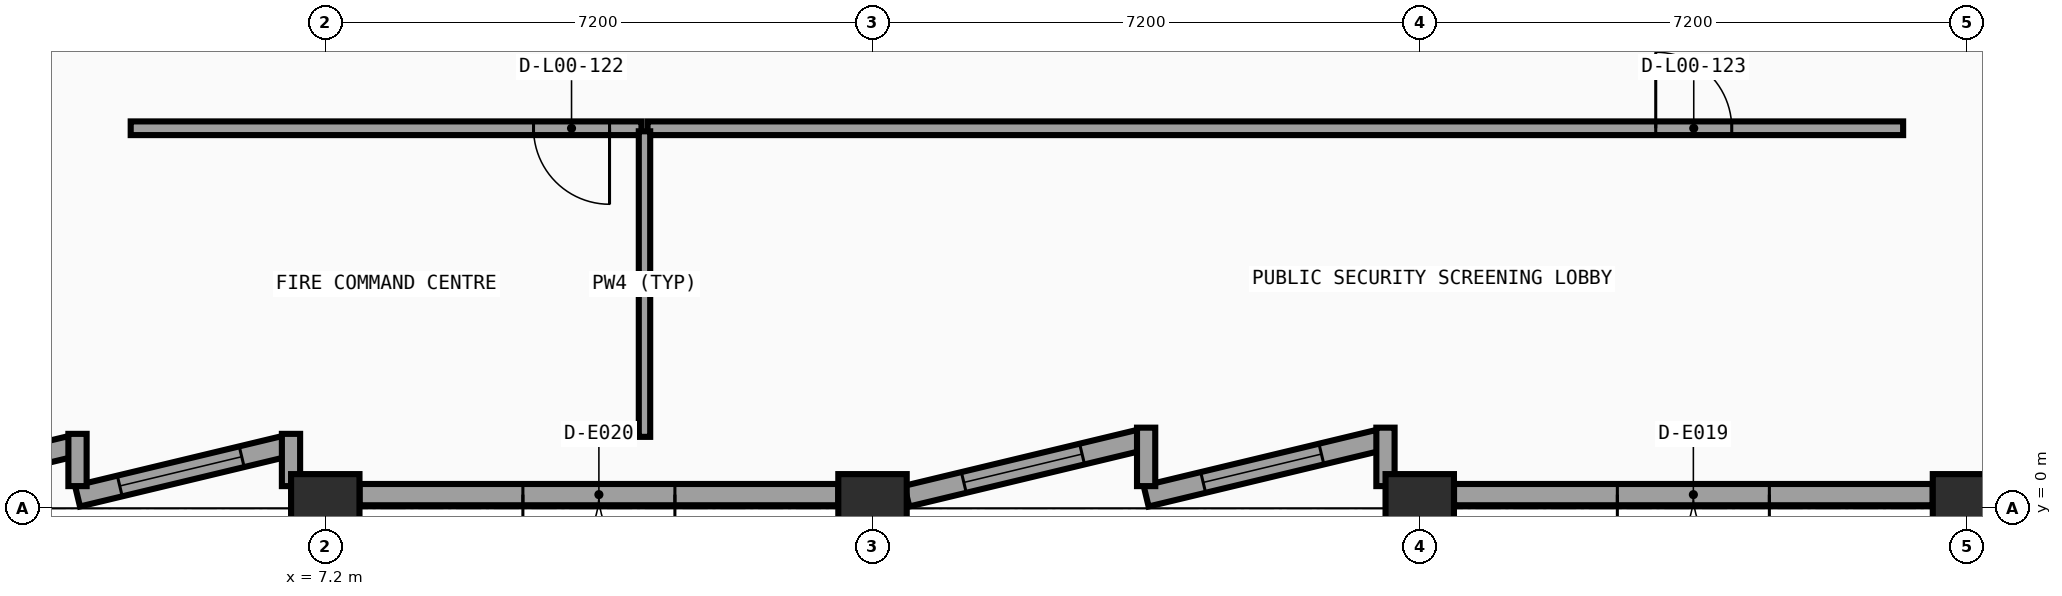
"""IFC4 building model, lengths in metres.
Left out: names, types, materials, properties, quantities, classifications, styles, units other than length and angle.
Written with IfcOpenShell. Run it as: python <this file> out.ifc"""

import sys

from ifc_helpers import new_model, si_unit, direction, frame, frame_2d, origin, origin_2d, place, context, subcontext, project, spatial, rectangle, extrude, element, fill, save


model = new_model("IFC4")
c1 = context("Model", 3, precision=1e-05, world=origin(), true_north=direction((0.0, 1.0)))
c2 = subcontext(c1, "Body", "Model", "MODEL_VIEW")
j1 = project(units=[si_unit("LENGTHUNIT", "METRE"), si_unit("PLANEANGLEUNIT", "RADIAN")], contexts=[c1])
p1 = place(None, origin())
s1 = spatial("IfcSite", under=j1, at=p1, CompositionType="ELEMENT")
p2 = place(p1, origin())
s2 = spatial("IfcBuilding", under=s1, at=p2, CompositionType="ELEMENT")
p3 = place(p2, origin())
s3 = spatial("IfcBuildingStorey", under=s2, at=p3, CompositionType="ELEMENT", Elevation=0.0)
for number, where, z_axis, x_axis in (
    (1, (7.2, 0.0, 0.0), (0.0, 0.0, 1.0), (1.0, 0.0, 0.0)),
    (2, (14.4, 0.0, 0.0), (0.0, 0.0, 1.0), (1.0, 0.0, 0.0)),
    (3, (21.6, 0.0, 0.0), (0.0, 0.0, 1.0), (1.0, 0.0, 0.0)),
    (4, (28.8, 0.0, 0.0), (0.0, 0.0, 1.0), (1.0, 0.0, 0.0)),
):
    element("IfcColumn", number, at=place(p3, frame(where, z_axis=z_axis, x_axis=x_axis)), inside=s3, PredefinedType="COLUMN", context=c2, shape_type="SweptSolid", body=[
        extrude(rectangle(XDim=0.9, YDim=0.9, at=origin_2d()), origin(), (0.0, 0.0, 1.0), 5.4),
    ])
p4 = place(p3, frame((28.349, 0.18, 0.0), z_axis=(0.0, 0.0, 1.0), x_axis=(-1.0, 0.0, 0.0)))
e5 = element("IfcWall", 5, at=p4, inside=s3, PredefinedType="SOLIDWALL", context=c2, shape_type="SweptSolid", body=[
    extrude(rectangle(XDim=6.298, YDim=0.28, at=frame_2d((3.149, 0.0))), origin(), (0.0, 0.0, 1.0), 4.411),
])
p5 = place(p4, frame((2.149, 0.0, 0.0)))
e6 = element("IfcOpeningElement", 6, at=p5, cuts=e5, PredefinedType="OPENING", context=c2, shape_type="SweptSolid", body=[
    extrude(rectangle(XDim=2.0, YDim=2.25, at=frame_2d((1.0, 1.125))), frame((0.0, 0.15, 0.0), z_axis=(0.0, -1.0, 0.0), x_axis=(1.0, 0.0, 0.0)), (0.0, 0.0, 1.0), 0.3),
])
p6 = place(p3, frame((21.057, 0.894, 0.0), z_axis=(0.0, 0.0, 1.0), x_axis=(-0.972366148661, -0.233461073712, 0.0)))
e7 = element("IfcWall", 7, at=p6, inside=s3, PredefinedType="SOLIDWALL", context=c2, shape_type="SweptSolid", body=[
    extrude(rectangle(XDim=3.144, YDim=0.28, at=frame_2d((1.572, 0.0))), origin(), (0.0, 0.0, 1.0), 4.411),
])
p7 = place(p6, frame((0.772, 0.0, 0.8)))
e8 = element("IfcOpeningElement", 8, at=p7, cuts=e7, PredefinedType="OPENING", context=c2, shape_type="SweptSolid", body=[
    extrude(rectangle(XDim=1.6, YDim=1.75, at=frame_2d((0.8, 0.875))), frame((0.0, 0.15, 0.0), z_axis=(0.0, -1.0, 0.0), x_axis=(1.0, 0.0, 0.0)), (0.0, 0.0, 1.0), 0.3),
])
p8 = place(p3, frame((21.149, 1.061, 0.0), z_axis=(0.0, 0.0, 1.0), x_axis=(0.0, -1.0, 0.0)))
e9 = element("IfcWall", 9, at=p8, inside=s3, PredefinedType="SOLIDWALL", context=c2, shape_type="SweptSolid", body=[
    extrude(rectangle(XDim=0.769, YDim=0.24, at=frame_2d((0.385, 0.0))), origin(), (0.0, 0.0, 1.0), 5.12),
])
p9 = place(p3, frame((17.908, 0.894, 0.0), z_axis=(0.0, 0.0, 1.0), x_axis=(-0.972366148661, -0.233461073712, 0.0)))
e10 = element("IfcWall", 10, at=p9, inside=s3, PredefinedType="SOLIDWALL", context=c2, shape_type="SweptSolid", body=[
    extrude(rectangle(XDim=3.144, YDim=0.28, at=frame_2d((1.572, 0.0))), origin(), (0.0, 0.0, 1.0), 4.411),
])
p10 = place(p9, frame((0.772, 0.0, 0.8)))
e11 = element("IfcOpeningElement", 11, at=p10, cuts=e10, PredefinedType="OPENING", context=c2, shape_type="SweptSolid", body=[
    extrude(rectangle(XDim=1.6, YDim=1.75, at=frame_2d((0.8, 0.875))), frame((0.0, 0.15, 0.0), z_axis=(0.0, -1.0, 0.0), x_axis=(1.0, 0.0, 0.0)), (0.0, 0.0, 1.0), 0.3),
])
p11 = place(p3, frame((18.0, 1.061, 0.0), z_axis=(0.0, 0.0, 1.0), x_axis=(0.0, -1.0, 0.0)))
e12 = element("IfcWall", 12, at=p11, inside=s3, PredefinedType="SOLIDWALL", context=c2, shape_type="SweptSolid", body=[
    extrude(rectangle(XDim=0.769, YDim=0.24, at=frame_2d((0.385, 0.0))), origin(), (0.0, 0.0, 1.0), 5.12),
])
p12 = place(p3, frame((13.949, 0.18, 0.0), z_axis=(0.0, 0.0, 1.0), x_axis=(-1.0, 0.0, 0.0)))
e13 = element("IfcWall", 13, at=p12, inside=s3, PredefinedType="SOLIDWALL", context=c2, shape_type="SweptSolid", body=[
    extrude(rectangle(XDim=6.298, YDim=0.28, at=frame_2d((3.149, 0.0))), origin(), (0.0, 0.0, 1.0), 4.411),
])
p13 = place(p12, frame((2.149, 0.0, 0.0)))
e14 = element("IfcOpeningElement", 14, at=p13, cuts=e13, PredefinedType="OPENING", context=c2, shape_type="SweptSolid", body=[
    extrude(rectangle(XDim=2.0, YDim=2.25, at=frame_2d((1.0, 1.125))), frame((0.0, 0.15, 0.0), z_axis=(0.0, -1.0, 0.0), x_axis=(1.0, 0.0, 0.0)), (0.0, 0.0, 1.0), 0.3),
])
p14 = place(p3, frame((6.656, 0.812, 0.0), z_axis=(0.0, 0.0, 1.0), x_axis=(-0.972357151242, -0.233498544812, 0.0)))
e15 = element("IfcWall", 15, at=p14, inside=s3, PredefinedType="SOLIDWALL", context=c2, shape_type="SweptSolid", body=[
    extrude(rectangle(XDim=2.794, YDim=0.28, at=frame_2d((1.397, 0.0))), origin(), (0.0, 0.0, 1.0), 4.411),
])
p15 = place(p14, frame((0.572, 0.0, 0.8)))
e16 = element("IfcOpeningElement", 16, at=p15, cuts=e15, PredefinedType="OPENING", context=c2, shape_type="SweptSolid", body=[
    extrude(rectangle(XDim=1.65, YDim=1.9, at=frame_2d((0.825, 0.95))), frame((0.0, 0.15, 0.0), z_axis=(0.0, -1.0, 0.0), x_axis=(1.0, 0.0, 0.0)), (0.0, 0.0, 1.0), 0.3),
])
p16 = place(p3, frame((6.749, 0.979, 0.0), z_axis=(0.0, 0.0, 1.0), x_axis=(0.0, -1.0, 0.0)))
e17 = element("IfcWall", 17, at=p16, inside=s3, PredefinedType="SOLIDWALL", context=c2, shape_type="SweptSolid", body=[
    extrude(rectangle(XDim=0.688, YDim=0.24, at=frame_2d((0.344, 0.0))), origin(), (0.0, 0.0, 1.0), 5.12),
])
p17 = place(p3, frame((3.848, 0.812, 0.0), z_axis=(0.0, 0.0, 1.0), x_axis=(-0.972357151242, -0.233498544812, 0.0)))
e18 = element("IfcWall", 18, at=p17, inside=s3, PredefinedType="SOLIDWALL", context=c2, shape_type="SweptSolid", body=[
    extrude(rectangle(XDim=2.794, YDim=0.28, at=frame_2d((1.397, 0.0))), origin(), (0.0, 0.0, 1.0), 4.411),
])
p18 = place(p17, frame((0.572, 0.0, 0.8)))
e19 = element("IfcOpeningElement", 19, at=p18, cuts=e18, PredefinedType="OPENING", context=c2, shape_type="SweptSolid", body=[
    extrude(rectangle(XDim=1.65, YDim=1.9, at=frame_2d((0.825, 0.95))), frame((0.0, 0.15, 0.0), z_axis=(0.0, -1.0, 0.0), x_axis=(1.0, 0.0, 0.0)), (0.0, 0.0, 1.0), 0.3),
])
p19 = place(p3, frame((3.94, 0.979, 0.0), z_axis=(0.0, 0.0, 1.0), x_axis=(0.0, -1.0, 0.0)))
e20 = element("IfcWall", 20, at=p19, inside=s3, PredefinedType="SOLIDWALL", context=c2, shape_type="SweptSolid", body=[
    extrude(rectangle(XDim=0.688, YDim=0.24, at=frame_2d((0.344, 0.0))), origin(), (0.0, 0.0, 1.0), 5.12),
])
p20 = place(p3, frame((4.64, 5.0, 0.0), z_axis=(0.0, 0.0, 1.0), x_axis=(1.0, 0.0, 0.0)))
e21 = element("IfcWall", 21, at=p20, inside=s3, PredefinedType="PARTITIONING", context=c2, shape_type="SweptSolid", body=[
    extrude(rectangle(XDim=6.72, YDim=0.18, at=frame_2d((3.36, 0.0))), origin(), (0.0, 0.0, 1.0), 4.311),
])
p21 = place(p20, frame((5.3, 0.0, 0.0)))
e22 = element("IfcOpeningElement", 22, at=p21, cuts=e21, PredefinedType="OPENING", context=c2, shape_type="SweptSolid", body=[
    extrude(rectangle(XDim=1.0, YDim=2.1, at=frame_2d((0.5, 1.05))), frame((0.0, 0.1, 0.0), z_axis=(0.0, -1.0, 0.0), x_axis=(1.0, 0.0, 0.0)), (0.0, 0.0, 1.0), 0.2),
])
p22 = place(p3, frame((11.44, 5.0, 0.0), z_axis=(0.0, 0.0, 1.0), x_axis=(1.0, 0.0, 0.0)))
e23 = element("IfcWall", 23, at=p22, inside=s3, PredefinedType="PARTITIONING", context=c2, shape_type="SweptSolid", body=[
    extrude(rectangle(XDim=16.52, YDim=0.18, at=frame_2d((8.26, 0.0))), origin(), (0.0, 0.0, 1.0), 4.311),
])
p23 = place(p22, frame((13.265, 0.0, 0.0)))
e24 = element("IfcOpeningElement", 24, at=p23, cuts=e23, PredefinedType="OPENING", context=c2, shape_type="SweptSolid", body=[
    extrude(rectangle(XDim=1.0, YDim=2.1, at=frame_2d((0.5, 1.05))), frame((0.0, 0.1, 0.0), z_axis=(0.0, -1.0, 0.0), x_axis=(1.0, 0.0, 0.0)), (0.0, 0.0, 1.0), 0.2),
])
p24 = place(p3, frame((11.4, 0.94, 0.0), z_axis=(0.0, 0.0, 1.0), x_axis=(0.0, 1.0, 0.0)))
e25 = element("IfcWall", 25, at=p24, inside=s3, PredefinedType="PARTITIONING", context=c2, shape_type="SweptSolid", body=[
    extrude(rectangle(XDim=4.02, YDim=0.15, at=frame_2d((2.01, 0.0))), origin(), (0.0, 0.0, 1.0), 4.606),
])
p25 = place(p5, origin())
e26 = element("IfcDoor", 26, at=p25, inside=s3, OperationType="DOUBLE_DOOR_SINGLE_SWING", PredefinedType="DOOR", context=c2, shape_type="SweptSolid", body=[
    extrude(rectangle(XDim=2.0, YDim=2.25, at=frame_2d((1.0, 1.125))), frame((0.0, 0.025, 0.0), z_axis=(0.0, -1.0, 0.0), x_axis=(1.0, 0.0, 0.0)), (0.0, 0.0, 1.0), 0.05),
])
fill(e6, e26)
p26 = place(p7, origin())
e27 = element("IfcWindow", 27, at=p26, inside=s3, PartitioningType="SINGLE_PANEL", PredefinedType="WINDOW", context=c2, shape_type="SweptSolid", body=[
    extrude(rectangle(XDim=1.6, YDim=1.75, at=frame_2d((0.8, 0.875))), frame((0.0, 0.03, 0.0), z_axis=(0.0, -1.0, 0.0), x_axis=(1.0, 0.0, 0.0)), (0.0, 0.0, 1.0), 0.06),
])
fill(e8, e27)
p27 = place(p10, origin())
e28 = element("IfcWindow", 28, at=p27, inside=s3, PartitioningType="SINGLE_PANEL", PredefinedType="WINDOW", context=c2, shape_type="SweptSolid", body=[
    extrude(rectangle(XDim=1.6, YDim=1.75, at=frame_2d((0.8, 0.875))), frame((0.0, 0.03, 0.0), z_axis=(0.0, -1.0, 0.0), x_axis=(1.0, 0.0, 0.0)), (0.0, 0.0, 1.0), 0.06),
])
fill(e11, e28)
p28 = place(p13, origin())
e29 = element("IfcDoor", 29, at=p28, inside=s3, OperationType="DOUBLE_DOOR_SINGLE_SWING", PredefinedType="DOOR", context=c2, shape_type="SweptSolid", body=[
    extrude(rectangle(XDim=2.0, YDim=2.25, at=frame_2d((1.0, 1.125))), frame((0.0, 0.025, 0.0), z_axis=(0.0, -1.0, 0.0), x_axis=(1.0, 0.0, 0.0)), (0.0, 0.0, 1.0), 0.05),
])
fill(e14, e29)
p29 = place(p15, origin())
e30 = element("IfcWindow", 30, at=p29, inside=s3, PartitioningType="SINGLE_PANEL", PredefinedType="WINDOW", context=c2, shape_type="SweptSolid", body=[
    extrude(rectangle(XDim=1.65, YDim=1.9, at=frame_2d((0.825, 0.95))), frame((0.0, 0.03, 0.0), z_axis=(0.0, -1.0, 0.0), x_axis=(1.0, 0.0, 0.0)), (0.0, 0.0, 1.0), 0.06),
])
fill(e16, e30)
p30 = place(p21, origin())
e31 = element("IfcDoor", 31, at=p30, inside=s3, OperationType="SINGLE_SWING_RIGHT", PredefinedType="DOOR", context=c2, shape_type="SweptSolid", body=[
    extrude(rectangle(XDim=1.0, YDim=2.1, at=frame_2d((0.5, 1.05))), frame((0.0, 0.025, 0.0), z_axis=(0.0, -1.0, 0.0), x_axis=(1.0, 0.0, 0.0)), (0.0, 0.0, 1.0), 0.05),
])
fill(e22, e31)
p31 = place(p23, origin())
e32 = element("IfcDoor", 32, at=p31, inside=s3, OperationType="SINGLE_SWING_LEFT", PredefinedType="DOOR", context=c2, shape_type="SweptSolid", body=[
    extrude(rectangle(XDim=1.0, YDim=2.1, at=frame_2d((0.5, 1.05))), frame((0.0, 0.025, 0.0), z_axis=(0.0, -1.0, 0.0), x_axis=(1.0, 0.0, 0.0)), (0.0, 0.0, 1.0), 0.05),
])
fill(e24, e32)
save(model, sys.argv[1])
